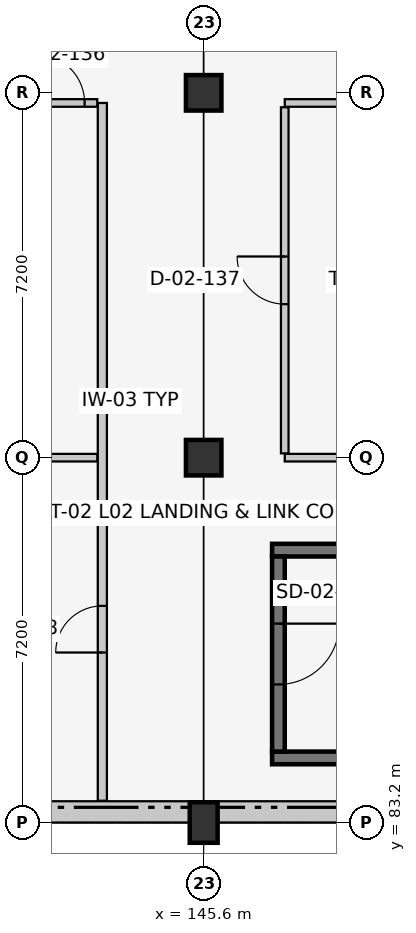
"""IFC4 building model, lengths in metres.
Left out: names, types, materials, properties, quantities, classifications, styles, units other than length and angle.
Written with IfcOpenShell. Run it as: python <this file> out.ifc"""

import sys

from ifc_helpers import new_model, si_unit, direction, frame, frame_2d, origin, origin_2d, place, context, subcontext, project, spatial, rectangle, extrude, element, fill, save


model = new_model("IFC4")
c1 = context("Model", 3, precision=1e-05, world=origin(), true_north=direction((0.0, 1.0)))
c2 = subcontext(c1, "Body", "Model", "MODEL_VIEW")
j1 = project(units=[si_unit("LENGTHUNIT", "METRE"), si_unit("PLANEANGLEUNIT", "RADIAN")], contexts=[c1])
p1 = place(None, origin())
s1 = spatial("IfcSite", under=j1, at=p1, CompositionType="ELEMENT")
p2 = place(p1, origin())
s2 = spatial("IfcBuilding", under=s1, at=p2, CompositionType="ELEMENT")
p3 = place(p2, frame((0.0, 0.0, 9.6)))
s3 = spatial("IfcBuildingStorey", under=s2, at=p3, CompositionType="ELEMENT", Elevation=9.6)
p4 = place(p3, frame((145.6, 83.2, 0.0), z_axis=(0.0, 0.0, 1.0), x_axis=(1.0, 0.0, 0.0)))
e1 = element("IfcColumn", 1, at=p4, inside=s3, PredefinedType="COLUMN", context=c2, shape_type="SweptSolid", body=[
    extrude(rectangle(XDim=0.55, YDim=0.8, at=origin_2d()), origin(), (0.0, 0.0, 1.0), 4.2),
])
for number, where, z_axis, x_axis in (
    (2, (145.6, 90.4, 0.0), (0.0, 0.0, 1.0), (1.0, 0.0, 0.0)),
    (3, (145.6, 97.6, 0.0), (0.0, 0.0, 1.0), (1.0, 0.0, 0.0)),
):
    element("IfcColumn", number, at=place(p3, frame(where, z_axis=z_axis, x_axis=x_axis)), inside=s3, PredefinedType="COLUMN", context=c2, shape_type="SweptSolid", body=[
        extrude(rectangle(XDim=0.7, YDim=0.7, at=origin_2d()), origin(), (0.0, 0.0, 1.0), 4.2),
    ])
p5 = place(p3, frame((160.0, 83.41, 0.0), z_axis=(0.0, 0.0, 1.0), x_axis=(-1.0, 0.0, 0.0)))
e4 = element("IfcWall", 4, at=p5, inside=s3, PredefinedType="SOLIDWALL", context=c2, shape_type="SweptSolid", body=[
    extrude(rectangle(XDim=28.8, YDim=0.42, at=frame_2d((14.4, 0.0))), origin(), (0.0, 0.0, 1.0), 3.245),
])
for number, where, z_axis, x_axis in (
    (5, (146.95, 84.475, 0.0), (0.0, 0.0, 1.0), (1.0, 0.0, 0.0)),
    (6, (155.85, 88.575, 0.0), (0.0, 0.0, 1.0), (-1.0, 0.0, 0.0)),
):
    element("IfcWall", number, at=place(p3, frame(where, z_axis=z_axis, x_axis=x_axis)), inside=s3, PredefinedType="SHEAR", context=c2, shape_type="SweptSolid", body=[
        extrude(rectangle(XDim=8.9, YDim=0.25, at=frame_2d((4.45, 0.0))), origin(), (0.0, 0.0, 1.0), 3.95),
    ])
p6 = place(p3, frame((147.075, 88.45, 0.0), z_axis=(0.0, 0.0, 1.0), x_axis=(0.0, -1.0, 0.0)))
e7 = element("IfcWall", 7, at=p6, inside=s3, PredefinedType="SHEAR", context=c2, shape_type="SweptSolid", body=[
    extrude(rectangle(XDim=3.85, YDim=0.25, at=frame_2d((1.925, 0.0))), origin(), (0.0, 0.0, 1.0), 3.95),
])
p7 = place(p6, frame((1.325, 0.0, 0.0)))
e8 = element("IfcOpeningElement", 8, at=p7, cuts=e7, PredefinedType="OPENING", context=c2, shape_type="SweptSolid", body=[
    extrude(rectangle(XDim=1.2, YDim=2.15, at=frame_2d((0.6, 1.075))), frame((0.0, 0.137, 0.0), z_axis=(0.0, -1.0, 0.0), x_axis=(1.0, 0.0, 0.0)), (0.0, 0.0, 1.0), 0.274),
])
p8 = place(p3, frame((143.6, 83.63, 0.0), z_axis=(0.0, 0.0, 1.0), x_axis=(0.0, 1.0, 0.0)))
e9 = element("IfcWall", 9, at=p8, inside=s3, PredefinedType="PARTITIONING", context=c2, shape_type="SweptSolid", body=[
    extrude(rectangle(XDim=13.77, YDim=0.18, at=frame_2d((6.885, 0.0))), origin(), (0.0, 0.0, 1.0), 3.95),
])
p9 = place(p8, frame((2.925, 0.0, 0.0)))
e10 = element("IfcOpeningElement", 10, at=p9, cuts=e9, PredefinedType="OPENING", context=c2, shape_type="SweptSolid", body=[
    extrude(rectangle(XDim=0.92, YDim=2.08, at=frame_2d((0.46, 1.04))), frame((0.0, 0.102, 0.0), z_axis=(0.0, -1.0, 0.0), x_axis=(1.0, 0.0, 0.0)), (0.0, 0.0, 1.0), 0.204),
])
p10 = place(p3, frame((131.63, 90.4, 0.0), z_axis=(0.0, 0.0, 1.0), x_axis=(1.0, 0.0, 0.0)))
e11 = element("IfcWall", 11, at=p10, inside=s3, PredefinedType="PARTITIONING", context=c2, shape_type="SweptSolid", body=[
    extrude(rectangle(XDim=11.87, YDim=0.15, at=frame_2d((5.935, 0.0))), origin(), (0.0, 0.0, 1.0), 3.225),
])
p11 = place(p3, frame((131.63, 97.4, 0.0), z_axis=(0.0, 0.0, 1.0), x_axis=(1.0, 0.0, 0.0)))
e12 = element("IfcWall", 12, at=p11, inside=s3, PredefinedType="PARTITIONING", context=c2, shape_type="SweptSolid", body=[
    extrude(rectangle(XDim=11.87, YDim=0.15, at=frame_2d((5.935, 0.0))), origin(), (0.0, 0.0, 1.0), 3.225),
])
p12 = place(p11, frame((10.66, 0.0, 0.0)))
e13 = element("IfcOpeningElement", 13, at=p12, cuts=e12, PredefinedType="OPENING", context=c2, shape_type="SweptSolid", body=[
    extrude(rectangle(XDim=0.96, YDim=2.1, at=frame_2d((0.48, 1.05))), frame((0.0, 0.087, 0.0), z_axis=(0.0, -1.0, 0.0), x_axis=(1.0, 0.0, 0.0)), (0.0, 0.0, 1.0), 0.174),
])
for number, where, z_axis, x_axis in (
    (14, (147.2, 90.4, 0.0), (0.0, 0.0, 1.0), (1.0, 0.0, 0.0)),
    (15, (147.2, 97.4, 0.0), (0.0, 0.0, 1.0), (1.0, 0.0, 0.0)),
):
    element("IfcWall", number, at=place(p3, frame(where, z_axis=z_axis, x_axis=x_axis)), inside=s3, PredefinedType="PARTITIONING", context=c2, shape_type="SweptSolid", body=[
        extrude(rectangle(XDim=6.2, YDim=0.15, at=frame_2d((3.1, 0.0))), origin(), (0.0, 0.0, 1.0), 3.075),
    ])
p13 = place(p3, frame((147.2, 90.485, 0.0), z_axis=(0.0, 0.0, 1.0), x_axis=(0.0, 1.0, 0.0)))
e16 = element("IfcWall", 16, at=p13, inside=s3, PredefinedType="PARTITIONING", context=c2, shape_type="SweptSolid", body=[
    extrude(rectangle(XDim=6.83, YDim=0.15, at=frame_2d((3.415, 0.0))), origin(), (0.0, 0.0, 1.0), 3.95),
])
p14 = place(p13, frame((2.945, 0.0, 0.0)))
e17 = element("IfcOpeningElement", 17, at=p14, cuts=e16, PredefinedType="OPENING", context=c2, shape_type="SweptSolid", body=[
    extrude(rectangle(XDim=0.94, YDim=2.1, at=frame_2d((0.47, 1.05))), frame((0.0, 0.087, 0.0), z_axis=(0.0, -1.0, 0.0), x_axis=(1.0, 0.0, 0.0)), (0.0, 0.0, 1.0), 0.174),
])
p15 = place(p7, origin())
e18 = element("IfcDoor", 18, at=p15, inside=s3, OperationType="SINGLE_SWING_LEFT", PredefinedType="DOOR", context=c2, shape_type="SweptSolid", body=[
    extrude(rectangle(XDim=1.2, YDim=2.15, at=frame_2d((0.6, 1.075))), frame((0.0, 0.025, 0.0), z_axis=(0.0, -1.0, 0.0), x_axis=(1.0, 0.0, 0.0)), (0.0, 0.0, 1.0), 0.05),
])
fill(e8, e18)
p16 = place(p12, origin())
e19 = element("IfcDoor", 19, at=p16, inside=s3, OperationType="SINGLE_SWING_LEFT", PredefinedType="DOOR", context=c2, shape_type="SweptSolid", body=[
    extrude(rectangle(XDim=0.96, YDim=2.1, at=frame_2d((0.48, 1.05))), frame((0.0, 0.025, 0.0), z_axis=(0.0, -1.0, 0.0), x_axis=(1.0, 0.0, 0.0)), (0.0, 0.0, 1.0), 0.05),
])
fill(e13, e19)
p17 = place(p14, origin())
e20 = element("IfcDoor", 20, at=p17, inside=s3, OperationType="SINGLE_SWING_RIGHT", PredefinedType="DOOR", context=c2, shape_type="SweptSolid", body=[
    extrude(rectangle(XDim=0.94, YDim=2.1, at=frame_2d((0.47, 1.05))), frame((0.0, 0.025, 0.0), z_axis=(0.0, -1.0, 0.0), x_axis=(1.0, 0.0, 0.0)), (0.0, 0.0, 1.0), 0.05),
])
fill(e17, e20)
p18 = place(p9, origin())
e21 = element("IfcDoor", 21, at=p18, inside=s3, OperationType="SINGLE_SWING_LEFT", PredefinedType="DOOR", context=c2, shape_type="SweptSolid", body=[
    extrude(rectangle(XDim=0.92, YDim=2.08, at=frame_2d((0.46, 1.04))), frame((0.0, 0.025, 0.0), z_axis=(0.0, -1.0, 0.0), x_axis=(1.0, 0.0, 0.0)), (0.0, 0.0, 1.0), 0.05),
])
fill(e10, e21)
save(model, sys.argv[1])
